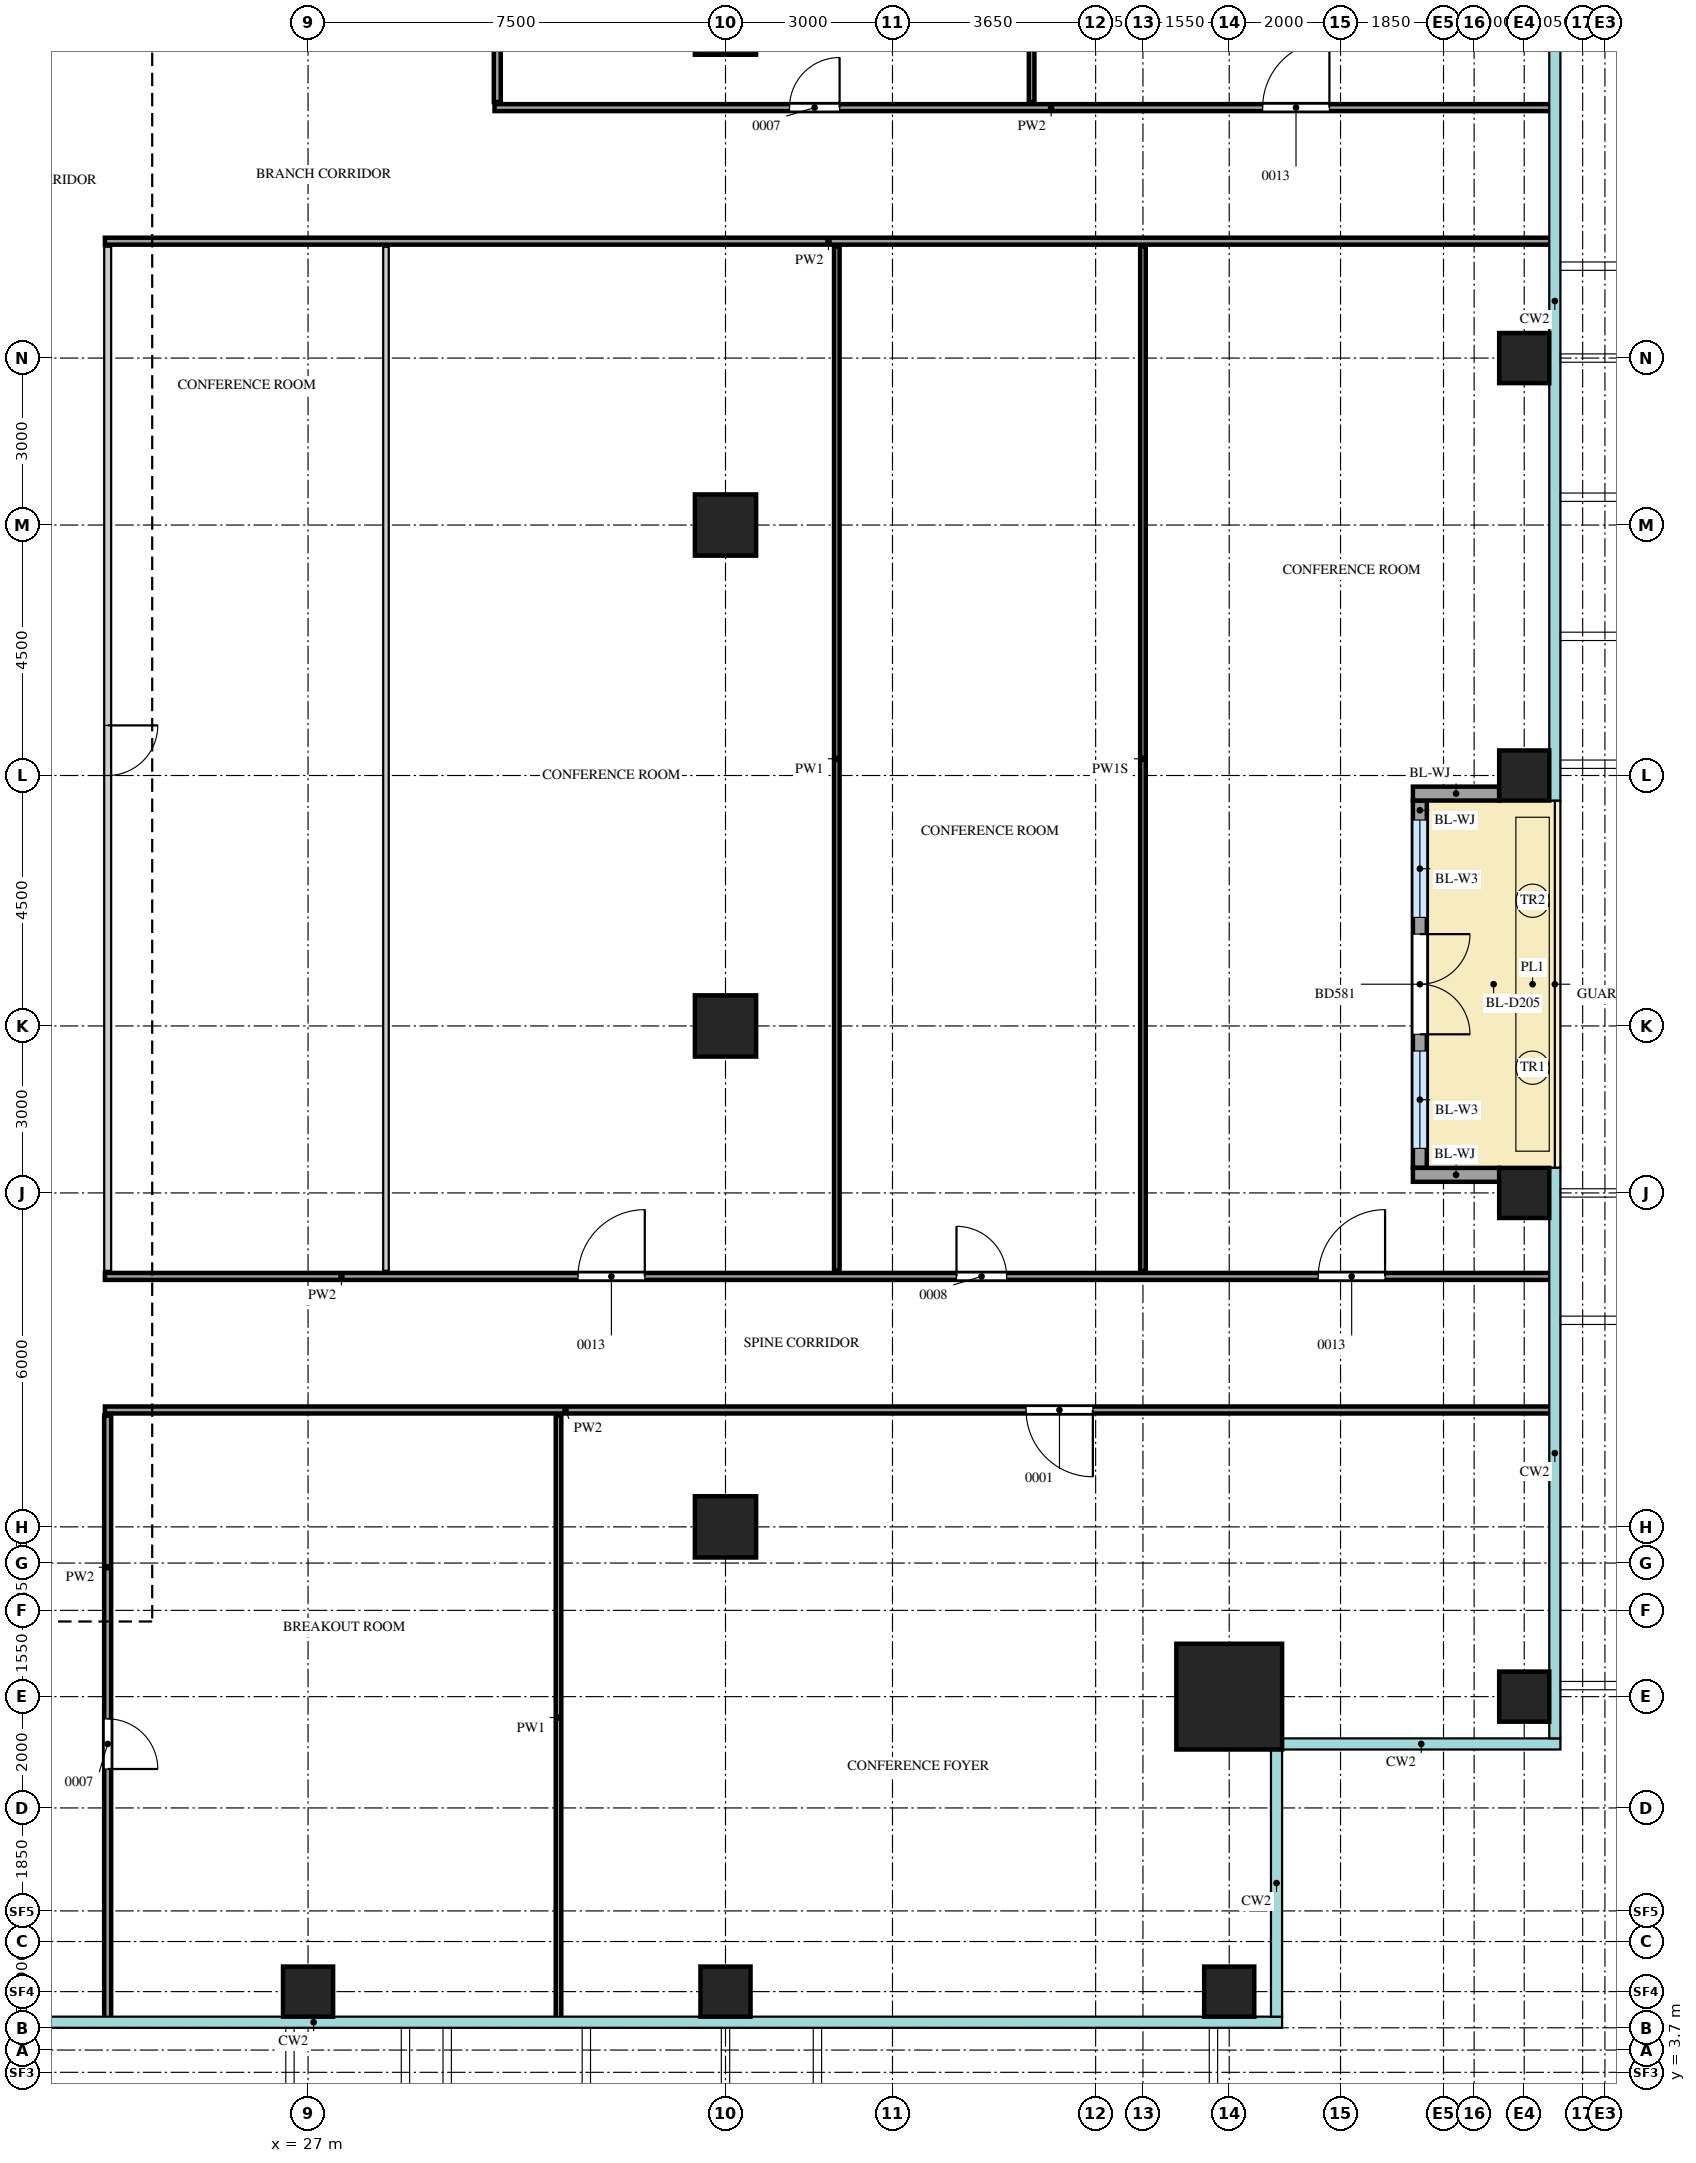
"""IFC4 building model, lengths in metres.
Left out: names, types, materials, properties, quantities, classifications, styles, units other than length and angle.
Written with IfcOpenShell. Run it as: python <this file> out.ifc"""

import sys

from ifc_helpers import new_model, si_unit, direction, frame, frame_2d, origin, origin_2d, place, context, subcontext, project, spatial, rectangle, extrude, source, transform, mapped, element, fill, save


model = new_model("IFC4")
c1 = context("Model", 3, precision=1e-05, world=origin(), true_north=direction((0.0, 1.0)))
c2 = subcontext(c1, "Body", "Model", "MODEL_VIEW")
j1 = project(units=[si_unit("LENGTHUNIT", "METRE"), si_unit("PLANEANGLEUNIT", "RADIAN")], contexts=[c1])
p1 = place(None, origin())
s1 = spatial("IfcSite", under=j1, at=p1, CompositionType="ELEMENT")
p2 = place(p1, origin())
s2 = spatial("IfcBuilding", under=s1, at=p2, CompositionType="ELEMENT")
p3 = place(p2, frame((0.0, 0.0, 258.2)))
s3 = spatial("IfcBuildingStorey", under=s2, at=p3, CompositionType="ELEMENT", Elevation=258.2)
m1 = source(origin(), c2, "Body", "SweptSolid", [
    extrude(rectangle(XDim=1.9, YDim=1.9, at=origin_2d()), origin(), (0.0, 0.0, 1.0), 4.0),
])
p4 = place(p3, frame((43.55, 10.45, 0.0), z_axis=(0.0, 0.0, 1.0), x_axis=(1.0, 0.0, 0.0)))
e1 = element("IfcColumn", 1, at=p4, inside=s3, PredefinedType="COLUMN", context=c2, shape_type="MappedRepresentation", body=[
    mapped(m1, transform((0.0, 0.0, 0.0))),
])
m2 = source(origin(), c2, "Body", "SweptSolid", [
    extrude(rectangle(XDim=0.9, YDim=0.9, at=origin_2d()), origin(), (0.0, 0.0, 1.0), 3.75),
])
for number, where, z_axis, x_axis in (
    (2, (27.0, 5.15, 0.0), (0.0, 0.0, 1.0), (1.0, 0.0, 0.0)),
    (3, (34.5, 5.15, 0.0), (0.0, 0.0, 1.0), (1.0, 0.0, 0.0)),
    (4, (43.55, 5.15, 0.0), (0.0, 0.0, 1.0), (1.0, 0.0, 0.0)),
    (5, (48.85, 10.45, 0.0), (0.0, 0.0, 1.0), (1.0, 0.0, 0.0)),
    (6, (48.85, 19.5, 0.0), (0.0, 0.0, 1.0), (1.0, 0.0, 0.0)),
    (7, (48.85, 27.0, 0.0), (0.0, 0.0, 1.0), (1.0, 0.0, 0.0)),
    (8, (48.85, 34.5, 0.0), (0.0, 0.0, 1.0), (1.0, 0.0, 0.0)),
):
    element("IfcColumn", number, at=place(p3, frame(where, z_axis=z_axis, x_axis=x_axis)), inside=s3, PredefinedType="COLUMN", context=c2, shape_type="MappedRepresentation", body=[
        mapped(m2, transform((0.0, 0.0, 0.0))),
    ])
m3 = source(origin(), c2, "Body", "SweptSolid", [
    extrude(rectangle(XDim=1.1, YDim=1.1, at=origin_2d()), origin(), (0.0, 0.0, 1.0), 3.75),
])
for number, where, z_axis, x_axis in (
    (9, (34.5, 13.5, 0.0), (0.0, 0.0, 1.0), (1.0, 0.0, 0.0)),
    (10, (34.5, 22.5, 0.0), (0.0, 0.0, 1.0), (1.0, 0.0, 0.0)),
    (11, (34.5, 31.5, 0.0), (0.0, 0.0, 1.0), (1.0, 0.0, 0.0)),
    (12, (34.5, 40.5, 0.0), (0.0, 0.0, 1.0), (1.0, 0.0, 0.0)),
):
    element("IfcColumn", number, at=place(p3, frame(where, z_axis=z_axis, x_axis=x_axis)), inside=s3, PredefinedType="COLUMN", context=c2, shape_type="MappedRepresentation", body=[
        mapped(m3, transform((0.0, 0.0, 0.0))),
    ])
m4 = source(origin(), c2, "Body", "SweptSolid", [
    extrude(rectangle(XDim=6.6, YDim=0.25, at=frame_2d((3.3, 0.0))), origin(), (0.0, 0.0, 1.0), 3.2),
])
p5 = place(p3, frame((46.975, 19.95, 0.0), z_axis=(0.0, 0.0, 1.0), x_axis=(0.0, 1.0, 0.0)))
e13 = element("IfcWall", 13, at=p5, inside=s3, PredefinedType="SOLIDWALL", context=c2, shape_type="MappedRepresentation", body=[
    mapped(m4, transform((0.0, 0.0, 0.0))),
])
m5 = source(origin(), c2, "Body", "SweptSolid", [
    extrude(rectangle(XDim=1.75, YDim=2.4, at=frame_2d((0.875, 1.2))), frame((0.0, 0.135, 0.0), z_axis=(0.0, -1.0, 0.0), x_axis=(1.0, 0.0, 0.0)), (0.0, 0.0, 1.0), 0.27),
])
p6 = place(p5, frame((0.35, 0.0, 0.0)))
e14 = element("IfcOpeningElement", 14, at=p6, cuts=e13, PredefinedType="OPENING", context=c2, shape_type="MappedRepresentation", body=[
    mapped(m5, transform((0.0, 0.0, 0.0))),
])
p7 = place(p5, frame((4.5, 0.0, 0.0)))
e15 = element("IfcOpeningElement", 15, at=p7, cuts=e13, PredefinedType="OPENING", context=c2, shape_type="MappedRepresentation", body=[
    mapped(m5, transform((0.0, 0.0, 0.0))),
])
m6 = source(origin(), c2, "Body", "SweptSolid", [
    extrude(rectangle(XDim=1.8, YDim=2.4, at=frame_2d((0.9, 1.2))), frame((0.0, 0.135, 0.0), z_axis=(0.0, -1.0, 0.0), x_axis=(1.0, 0.0, 0.0)), (0.0, 0.0, 1.0), 0.27),
])
p8 = place(p5, frame((2.4, 0.0, 0.0)))
e16 = element("IfcOpeningElement", 16, at=p8, cuts=e13, PredefinedType="OPENING", context=c2, shape_type="MappedRepresentation", body=[
    mapped(m6, transform((0.0, 0.0, 0.0))),
])
m7 = source(origin(), c2, "Body", "SweptSolid", [
    extrude(rectangle(XDim=1.55, YDim=0.25, at=frame_2d((0.775, 0.0))), origin(), (0.0, 0.0, 1.0), 3.2),
])
for number, where, z_axis, x_axis in (
    (17, (48.4, 19.825, 0.0), (0.0, 0.0, 1.0), (-1.0, 0.0, 0.0)),
    (18, (48.4, 26.675, 0.0), (0.0, 0.0, 1.0), (-1.0, 0.0, 0.0)),
):
    element("IfcWall", number, at=place(p3, frame(where, z_axis=z_axis, x_axis=x_axis)), inside=s3, PredefinedType="SOLIDWALL", context=c2, shape_type="MappedRepresentation", body=[
        mapped(m7, transform((0.0, 0.0, 0.0))),
    ])
m8 = source(origin(), c2, "Body", "SweptSolid", [
    extrude(rectangle(XDim=10.85, YDim=0.125, at=frame_2d((5.425, 0.0))), origin(), (0.0, 0.0, 1.0), 3.8),
])
p9 = place(p3, frame((23.4, 4.65, 0.0), z_axis=(0.0, 0.0, 1.0), x_axis=(0.0, 1.0, 0.0)))
e19 = element("IfcWall", 19, at=p9, inside=s3, PredefinedType="PARTITIONING", context=c2, shape_type="MappedRepresentation", body=[
    mapped(m8, transform((0.0, 0.0, 0.0))),
])
m9 = source(origin(), c2, "Body", "SweptSolid", [
    extrude(rectangle(XDim=0.9, YDim=2.1, at=frame_2d((0.45, 1.05))), frame((0.0, 0.073, 0.0), z_axis=(0.0, -1.0, 0.0), x_axis=(1.0, 0.0, 0.0)), (0.0, 0.0, 1.0), 0.145),
])
p10 = place(p9, frame((4.5, 0.0, 0.0)))
e20 = element("IfcOpeningElement", 20, at=p10, cuts=e19, PredefinedType="OPENING", context=c2, shape_type="MappedRepresentation", body=[
    mapped(m9, transform((0.0, 0.0, 0.0))),
])
m10 = source(origin(), c2, "Body", "SweptSolid", [
    extrude(rectangle(XDim=10.85, YDim=0.1, at=frame_2d((5.425, 0.0))), origin(), (0.0, 0.0, 1.0), 3.8),
])
p11 = place(p3, frame((31.5, 4.65, 0.0), z_axis=(0.0, 0.0, 1.0), x_axis=(0.0, 1.0, 0.0)))
e21 = element("IfcWall", 21, at=p11, inside=s3, PredefinedType="PARTITIONING", context=c2, shape_type="MappedRepresentation", body=[
    mapped(m10, transform((0.0, 0.0, 0.0))),
])
m11 = source(origin(), c2, "Body", "SweptSolid", [
    extrude(rectangle(XDim=26.0, YDim=0.125, at=frame_2d((13.0, 0.0))), origin(), (0.0, 0.0, 1.0), 3.8),
])
p12 = place(p3, frame((23.35, 15.6, 0.0), z_axis=(0.0, 0.0, 1.0), x_axis=(1.0, 0.0, 0.0)))
e22 = element("IfcWall", 22, at=p12, inside=s3, PredefinedType="PARTITIONING", context=c2, shape_type="MappedRepresentation", body=[
    mapped(m11, transform((0.0, 0.0, 0.0))),
])
m12 = source(origin(), c2, "Body", "SweptSolid", [
    extrude(rectangle(XDim=1.2, YDim=2.1, at=frame_2d((0.6, 1.05))), frame((0.0, 0.073, 0.0), z_axis=(0.0, -1.0, 0.0), x_axis=(1.0, 0.0, 0.0)), (0.0, 0.0, 1.0), 0.145),
])
p13 = place(p12, frame((16.55, 0.0, 0.0)))
e23 = element("IfcOpeningElement", 23, at=p13, cuts=e22, PredefinedType="OPENING", context=c2, shape_type="MappedRepresentation", body=[
    mapped(m12, transform((0.0, 0.0, 0.0))),
])
p14 = place(p3, frame((23.35, 18.0, 0.0), z_axis=(0.0, 0.0, 1.0), x_axis=(1.0, 0.0, 0.0)))
e24 = element("IfcWall", 24, at=p14, inside=s3, PredefinedType="PARTITIONING", context=c2, shape_type="MappedRepresentation", body=[
    mapped(m11, transform((0.0, 0.0, 0.0))),
])
p15 = place(p14, frame((8.5, 0.0, 0.0)))
e25 = element("IfcOpeningElement", 25, at=p15, cuts=e24, PredefinedType="OPENING", context=c2, shape_type="MappedRepresentation", body=[
    mapped(m12, transform((0.0, 0.0, 0.0))),
])
p16 = place(p14, frame((15.3, 0.0, 0.0)))
e26 = element("IfcOpeningElement", 26, at=p16, cuts=e24, PredefinedType="OPENING", context=c2, shape_type="MappedRepresentation", body=[
    mapped(m9, transform((0.0, 0.0, 0.0))),
])
p17 = place(p14, frame((21.8, 0.0, 0.0)))
e27 = element("IfcOpeningElement", 27, at=p17, cuts=e24, PredefinedType="OPENING", context=c2, shape_type="MappedRepresentation", body=[
    mapped(m12, transform((0.0, 0.0, 0.0))),
])
m13 = source(origin(), c2, "Body", "SweptSolid", [
    extrude(rectangle(XDim=18.4, YDim=0.125, at=frame_2d((9.2, 0.0))), origin(), (0.0, 0.0, 1.0), 3.8),
])
p18 = place(p3, frame((23.4, 18.1, 0.0), z_axis=(0.0, 0.0, 1.0), x_axis=(0.0, 1.0, 0.0)))
e28 = element("IfcWall", 28, at=p18, inside=s3, PredefinedType="PARTITIONING", context=c2, shape_type="MappedRepresentation", body=[
    mapped(m13, transform((0.0, 0.0, 0.0))),
])
p19 = place(p18, frame((8.9, 0.0, 0.0)))
e29 = element("IfcOpeningElement", 29, at=p19, cuts=e28, PredefinedType="OPENING", context=c2, shape_type="MappedRepresentation", body=[
    mapped(m9, transform((0.0, 0.0, 0.0))),
])
m14 = source(origin(), c2, "Body", "SweptSolid", [
    extrude(rectangle(XDim=18.4, YDim=0.1, at=frame_2d((9.2, 0.0))), origin(), (0.0, 0.0, 1.0), 3.8),
])
for number, where, z_axis, x_axis in (
    (30, (28.4, 18.1, 0.0), (0.0, 0.0, 1.0), (0.0, 1.0, 0.0)),
    (31, (36.5, 18.1, 0.0), (0.0, 0.0, 1.0), (0.0, 1.0, 0.0)),
):
    element("IfcWall", number, at=place(p3, frame(where, z_axis=z_axis, x_axis=x_axis)), inside=s3, PredefinedType="PARTITIONING", context=c2, shape_type="MappedRepresentation", body=[
        mapped(m14, transform((0.0, 0.0, 0.0))),
    ])
m15 = source(origin(), c2, "Body", "SweptSolid", [
    extrude(rectangle(XDim=18.4, YDim=0.1, at=frame_2d((9.2, 0.0))), origin(), (0.0, 0.0, 1.0), 3.35),
])
p20 = place(p3, frame((42.0, 18.1, 0.0), z_axis=(0.0, 0.0, 1.0), x_axis=(0.0, 1.0, 0.0)))
e32 = element("IfcWall", 32, at=p20, inside=s3, PredefinedType="PARTITIONING", context=c2, shape_type="MappedRepresentation", body=[
    mapped(m15, transform((0.0, 0.0, 0.0))),
])
p21 = place(p3, frame((23.35, 36.6, 0.0), z_axis=(0.0, 0.0, 1.0), x_axis=(1.0, 0.0, 0.0)))
e33 = element("IfcWall", 33, at=p21, inside=s3, PredefinedType="PARTITIONING", context=c2, shape_type="MappedRepresentation", body=[
    mapped(m11, transform((0.0, 0.0, 0.0))),
])
m16 = source(origin(), c2, "Body", "SweptSolid", [
    extrude(rectangle(XDim=19.0, YDim=0.125, at=frame_2d((9.5, 0.0))), origin(), (0.0, 0.0, 1.0), 3.8),
])
p22 = place(p3, frame((30.35, 39.0, 0.0), z_axis=(0.0, 0.0, 1.0), x_axis=(1.0, 0.0, 0.0)))
e34 = element("IfcWall", 34, at=p22, inside=s3, PredefinedType="PARTITIONING", context=c2, shape_type="MappedRepresentation", body=[
    mapped(m16, transform((0.0, 0.0, 0.0))),
])
p23 = place(p22, frame((5.3, 0.0, 0.0)))
e35 = element("IfcOpeningElement", 35, at=p23, cuts=e34, PredefinedType="OPENING", context=c2, shape_type="MappedRepresentation", body=[
    mapped(m9, transform((0.0, 0.0, 0.0))),
])
p24 = place(p22, frame((13.8, 0.0, 0.0)))
e36 = element("IfcOpeningElement", 36, at=p24, cuts=e34, PredefinedType="OPENING", context=c2, shape_type="MappedRepresentation", body=[
    mapped(m12, transform((0.0, 0.0, 0.0))),
])
m17 = source(origin(), c2, "Body", "SweptSolid", [
    extrude(rectangle(XDim=10.25, YDim=0.125, at=frame_2d((5.125, 0.0))), origin(), (0.0, 0.0, 1.0), 3.8),
])
p25 = place(p3, frame((30.4, 39.1, 0.0), z_axis=(0.0, 0.0, 1.0), x_axis=(0.0, 1.0, 0.0)))
e37 = element("IfcWall", 37, at=p25, inside=s3, PredefinedType="PARTITIONING", context=c2, shape_type="MappedRepresentation", body=[
    mapped(m17, transform((0.0, 0.0, 0.0))),
])
m18 = source(origin(), c2, "Body", "SweptSolid", [
    extrude(rectangle(XDim=10.25, YDim=0.1, at=frame_2d((5.125, 0.0))), origin(), (0.0, 0.0, 1.0), 3.8),
])
p26 = place(p3, frame((40.0, 39.1, 0.0), z_axis=(0.0, 0.0, 1.0), x_axis=(0.0, 1.0, 0.0)))
e38 = element("IfcWall", 38, at=p26, inside=s3, PredefinedType="PARTITIONING", context=c2, shape_type="MappedRepresentation", body=[
    mapped(m18, transform((0.0, 0.0, 0.0))),
])
m19 = source(origin(), c2, "Body", "SweptSolid", [
    extrude(rectangle(XDim=1.75, YDim=2.4, at=frame_2d((0.875, 1.2))), frame((0.0, 0.03, 0.0), z_axis=(0.0, -1.0, 0.0), x_axis=(1.0, 0.0, 0.0)), (0.0, 0.0, 1.0), 0.06),
])
p27 = place(p6, origin())
e39 = element("IfcWindow", 39, at=p27, inside=s3, PartitioningType="SINGLE_PANEL", PredefinedType="WINDOW", context=c2, shape_type="MappedRepresentation", body=[
    mapped(m19, transform((0.0, 0.0, 0.0))),
])
fill(e14, e39)
p28 = place(p7, origin())
e40 = element("IfcWindow", 40, at=p28, inside=s3, PartitioningType="SINGLE_PANEL", PredefinedType="WINDOW", context=c2, shape_type="MappedRepresentation", body=[
    mapped(m19, transform((0.0, 0.0, 0.0))),
])
fill(e15, e40)
m20 = source(origin(), c2, "Body", "SweptSolid", [
    extrude(rectangle(XDim=1.8, YDim=2.4, at=frame_2d((0.9, 1.2))), frame((0.0, 0.025, 0.0), z_axis=(0.0, -1.0, 0.0), x_axis=(1.0, 0.0, 0.0)), (0.0, 0.0, 1.0), 0.05),
])
p29 = place(p8, origin())
e41 = element("IfcDoor", 41, at=p29, inside=s3, OperationType="DOUBLE_DOOR_DOUBLE_SWING", PredefinedType="DOOR", context=c2, shape_type="MappedRepresentation", body=[
    mapped(m20, transform((0.0, 0.0, 0.0))),
])
fill(e16, e41)
m21 = source(origin(), c2, "Body", "SweptSolid", [
    extrude(rectangle(XDim=0.9, YDim=2.1, at=frame_2d((0.45, 1.05))), frame((0.0, 0.025, 0.0), z_axis=(0.0, -1.0, 0.0), x_axis=(1.0, 0.0, 0.0)), (0.0, 0.0, 1.0), 0.05),
])
p30 = place(p10, origin())
e42 = element("IfcDoor", 42, at=p30, inside=s3, OperationType="SINGLE_SWING_LEFT", PredefinedType="DOOR", context=c2, shape_type="MappedRepresentation", body=[
    mapped(m21, transform((0.0, 0.0, 0.0))),
])
fill(e20, e42)
m22 = source(origin(), c2, "Body", "SweptSolid", [
    extrude(rectangle(XDim=1.2, YDim=2.1, at=frame_2d((0.6, 1.05))), frame((0.0, 0.025, 0.0), z_axis=(0.0, -1.0, 0.0), x_axis=(1.0, 0.0, 0.0)), (0.0, 0.0, 1.0), 0.05),
])
p31 = place(p13, origin())
e43 = element("IfcDoor", 43, at=p31, inside=s3, OperationType="SINGLE_SWING_RIGHT", PredefinedType="DOOR", context=c2, shape_type="MappedRepresentation", body=[
    mapped(m22, transform((0.0, 0.0, 0.0))),
])
fill(e23, e43)
p32 = place(p19, origin())
e44 = element("IfcDoor", 44, at=p32, inside=s3, OperationType="SINGLE_SWING_RIGHT", PredefinedType="DOOR", context=c2, shape_type="MappedRepresentation", body=[
    mapped(m21, transform((0.0, 0.0, 0.0))),
])
fill(e29, e44)
p33 = place(p15, origin())
e45 = element("IfcDoor", 45, at=p33, inside=s3, OperationType="SINGLE_SWING_LEFT", PredefinedType="DOOR", context=c2, shape_type="MappedRepresentation", body=[
    mapped(m22, transform((0.0, 0.0, 0.0))),
])
fill(e25, e45)
p34 = place(p16, origin())
e46 = element("IfcDoor", 46, at=p34, inside=s3, OperationType="SINGLE_SWING_RIGHT", PredefinedType="DOOR", context=c2, shape_type="MappedRepresentation", body=[
    mapped(m21, transform((0.0, 0.0, 0.0))),
])
fill(e26, e46)
p35 = place(p17, origin())
e47 = element("IfcDoor", 47, at=p35, inside=s3, OperationType="SINGLE_SWING_LEFT", PredefinedType="DOOR", context=c2, shape_type="MappedRepresentation", body=[
    mapped(m22, transform((0.0, 0.0, 0.0))),
])
fill(e27, e47)
p36 = place(p23, origin())
e48 = element("IfcDoor", 48, at=p36, inside=s3, OperationType="SINGLE_SWING_LEFT", PredefinedType="DOOR", context=c2, shape_type="MappedRepresentation", body=[
    mapped(m21, transform((0.0, 0.0, 0.0))),
])
fill(e35, e48)
p37 = place(p24, origin())
e49 = element("IfcDoor", 49, at=p37, inside=s3, OperationType="SINGLE_SWING_LEFT", PredefinedType="DOOR", context=c2, shape_type="MappedRepresentation", body=[
    mapped(m22, transform((0.0, 0.0, 0.0))),
])
fill(e36, e49)
save(model, sys.argv[1])
